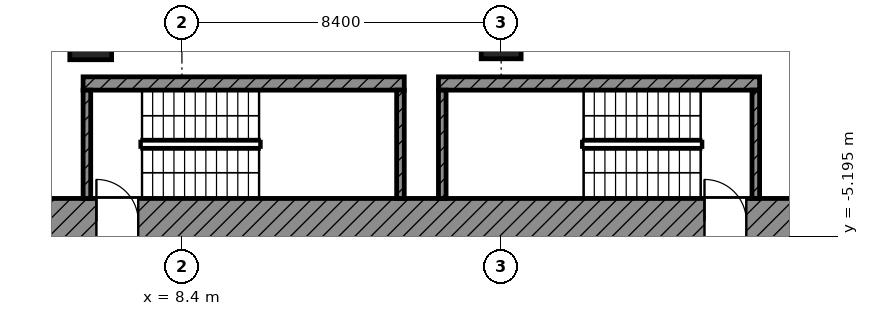
"""IFC4 building model, lengths in metres.
Left out: names, types, materials, properties, quantities, classifications, styles, units other than length and angle.
Written with IfcOpenShell. Run it as: python <this file> out.ifc"""

import sys

from ifc_helpers import new_model, si_unit, direction, frame, frame_2d, origin, origin_2d, place, context, subcontext, project, spatial, rectangle, extrude, element, fill, save


model = new_model("IFC4")
c1 = context("Model", 3, precision=1e-05, world=origin(), true_north=direction((0.0, 1.0)))
c2 = subcontext(c1, "Body", "Model", "MODEL_VIEW")
j1 = project(units=[si_unit("LENGTHUNIT", "METRE"), si_unit("PLANEANGLEUNIT", "RADIAN")], contexts=[c1])
p1 = place(None, origin())
s1 = spatial("IfcSite", under=j1, at=p1, CompositionType="ELEMENT")
p2 = place(p1, origin())
s2 = spatial("IfcBuilding", under=s1, at=p2, CompositionType="ELEMENT")
p3 = place(p2, frame((0.0, 0.0, 119.8)))
s3 = spatial("IfcBuildingStorey", under=s2, at=p3, CompositionType="ELEMENT", Elevation=119.8)
p4 = place(p3, frame((6.0, 0.0, 0.0), z_axis=(0.0, 0.0, 1.0), x_axis=(1.0, 0.0, 0.0)))
e1 = element("IfcColumn", 1, at=p4, inside=s3, PredefinedType="COLUMN", context=c2, shape_type="SweptSolid", body=[
    extrude(rectangle(XDim=1.1, YDim=1.1, at=origin_2d()), origin(), (0.0, 0.0, 1.0), 4.2),
])
p5 = place(p3, frame((16.8, 0.0, 0.0), z_axis=(0.0, 0.0, 1.0), x_axis=(1.0, 0.0, 0.0)))
e2 = element("IfcColumn", 2, at=p5, inside=s3, PredefinedType="COLUMN", context=c2, shape_type="SweptSolid", body=[
    extrude(rectangle(XDim=1.05, YDim=1.05, at=origin_2d()), origin(), (0.0, 0.0, 1.0), 4.2),
])
p6 = place(p3, frame((4.2, -4.8, 0.0), z_axis=(0.0, 0.0, 1.0), x_axis=(1.0, 0.0, 0.0)))
e3 = element("IfcWall", 3, at=p6, inside=s3, PredefinedType="SHEAR", context=c2, shape_type="SweptSolid", body=[
    extrude(rectangle(XDim=20.8, YDim=1.2, at=frame_2d((10.4, 0.0))), origin(), (0.0, 0.0, 1.0), 3.6),
])
p7 = place(p6, frame((1.95, 0.0, 0.0)))
e4 = element("IfcOpeningElement", 4, at=p7, cuts=e3, PredefinedType="OPENING", context=c2, shape_type="SweptSolid", body=[
    extrude(rectangle(XDim=1.1, YDim=2.1, at=frame_2d((0.55, 1.05))), frame((0.0, 0.61, 0.0), z_axis=(0.0, -1.0, 0.0), x_axis=(1.0, 0.0, 0.0)), (0.0, 0.0, 1.0), 1.22),
])
p8 = place(p6, frame((17.95, 0.0, 0.0)))
e5 = element("IfcOpeningElement", 5, at=p8, cuts=e3, PredefinedType="OPENING", context=c2, shape_type="SweptSolid", body=[
    extrude(rectangle(XDim=1.1, YDim=2.1, at=frame_2d((0.55, 1.05))), frame((0.0, 0.61, 0.0), z_axis=(0.0, -1.0, 0.0), x_axis=(1.0, 0.0, 0.0)), (0.0, 0.0, 1.0), 1.22),
])
p9 = place(p3, frame((5.8, -1.175, 0.0), z_axis=(0.0, 0.0, 1.0), x_axis=(1.0, 0.0, 0.0)))
e6 = element("IfcWall", 6, at=p9, inside=s3, PredefinedType="SHEAR", context=c2, shape_type="SweptSolid", body=[
    extrude(rectangle(XDim=8.45, YDim=0.35, at=frame_2d((4.225, 0.0))), origin(), (0.0, 0.0, 1.0), 3.6),
])
for number, where, z_axis, x_axis in (
    (7, (5.9, -4.2, 0.0), (0.0, 0.0, 1.0), (0.0, 1.0, 0.0)),
    (8, (14.15, -4.2, 0.0), (0.0, 0.0, 1.0), (0.0, 1.0, 0.0)),
):
    element("IfcWall", number, at=place(p3, frame(where, z_axis=z_axis, x_axis=x_axis)), inside=s3, PredefinedType="SHEAR", context=c2, shape_type="SweptSolid", body=[
        extrude(rectangle(XDim=2.85, YDim=0.2, at=frame_2d((1.425, 0.0))), origin(), (0.0, 0.0, 1.0), 3.6),
    ])
p10 = place(p3, frame((15.15, -1.175, 0.0), z_axis=(0.0, 0.0, 1.0), x_axis=(1.0, 0.0, 0.0)))
e9 = element("IfcWall", 9, at=p10, inside=s3, PredefinedType="SHEAR", context=c2, shape_type="SweptSolid", body=[
    extrude(rectangle(XDim=8.45, YDim=0.35, at=frame_2d((4.225, 0.0))), origin(), (0.0, 0.0, 1.0), 3.6),
])
for number, where, z_axis, x_axis in (
    (10, (15.25, -4.2, 0.0), (0.0, 0.0, 1.0), (0.0, 1.0, 0.0)),
    (11, (23.5, -4.2, 0.0), (0.0, 0.0, 1.0), (0.0, 1.0, 0.0)),
):
    element("IfcWall", number, at=place(p3, frame(where, z_axis=z_axis, x_axis=x_axis)), inside=s3, PredefinedType="SHEAR", context=c2, shape_type="SweptSolid", body=[
        extrude(rectangle(XDim=2.85, YDim=0.2, at=frame_2d((1.425, 0.0))), origin(), (0.0, 0.0, 1.0), 3.6),
    ])
p11 = place(p7, origin())
e12 = element("IfcDoor", 12, at=p11, inside=s3, OperationType="SINGLE_SWING_LEFT", PredefinedType="DOOR", context=c2, shape_type="SweptSolid", body=[
    extrude(rectangle(XDim=1.1, YDim=2.1, at=frame_2d((0.55, 1.05))), frame((0.0, 0.025, 0.0), z_axis=(0.0, -1.0, 0.0), x_axis=(1.0, 0.0, 0.0)), (0.0, 0.0, 1.0), 0.05),
])
fill(e4, e12)
p12 = place(p8, origin())
e13 = element("IfcDoor", 13, at=p12, inside=s3, OperationType="SINGLE_SWING_LEFT", PredefinedType="DOOR", context=c2, shape_type="SweptSolid", body=[
    extrude(rectangle(XDim=1.1, YDim=2.1, at=frame_2d((0.55, 1.05))), frame((0.0, 0.025, 0.0), z_axis=(0.0, -1.0, 0.0), x_axis=(1.0, 0.0, 0.0)), (0.0, 0.0, 1.0), 0.05),
])
fill(e5, e13)
save(model, sys.argv[1])
